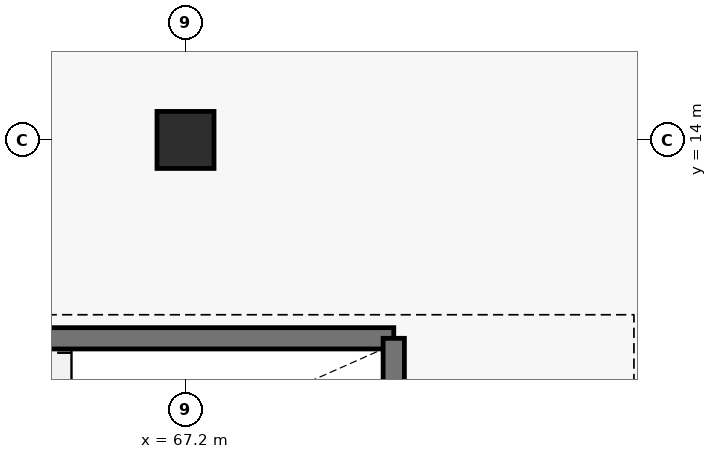
"""IFC4 building model, lengths in metres.
Left out: names, types, materials, properties, quantities, classifications, styles, units other than length and angle.
Written with IfcOpenShell. Run it as: python <this file> out.ifc"""

import sys

from ifc_helpers import new_model, si_unit, direction, frame, frame_2d, origin, origin_2d, place, context, subcontext, project, spatial, rectangle, extrude, element, save


model = new_model("IFC4")
c1 = context("Model", 3, precision=1e-05, world=origin(), true_north=direction((0.0, 1.0)))
c2 = subcontext(c1, "Body", "Model", "MODEL_VIEW")
j1 = project(units=[si_unit("LENGTHUNIT", "METRE"), si_unit("PLANEANGLEUNIT", "RADIAN")], contexts=[c1])
p1 = place(None, origin())
s1 = spatial("IfcSite", under=j1, at=p1, CompositionType="ELEMENT")
p2 = place(p1, origin())
s2 = spatial("IfcBuilding", under=s1, at=p2, CompositionType="ELEMENT")
p3 = place(p2, frame((0.0, 0.0, 9.6)))
s3 = spatial("IfcBuildingStorey", under=s2, at=p3, CompositionType="ELEMENT", Elevation=9.6)
p4 = place(p3, frame((67.2, 14.0, 0.0), z_axis=(0.0, 0.0, 1.0), x_axis=(1.0, 0.0, 0.0)))
e1 = element("IfcColumn", 1, at=p4, inside=s3, PredefinedType="COLUMN", context=c2, shape_type="SweptSolid", body=[
    extrude(rectangle(XDim=0.75, YDim=0.75, at=origin_2d()), origin(), (0.0, 0.0, 1.0), 3.52),
])
p5 = place(p3, frame((61.06, 11.39, 0.0), z_axis=(0.0, 0.0, 1.0), x_axis=(1.0, 0.0, 0.0)))
e2 = element("IfcWall", 2, at=p5, inside=s3, PredefinedType="SHEAR", context=c2, shape_type="SweptSolid", body=[
    extrude(rectangle(XDim=8.88, YDim=0.28, at=frame_2d((4.44, 0.0))), origin(), (0.0, 0.0, 1.0), 3.52),
])
p6 = place(p3, frame((69.94, 7.96, 0.0), z_axis=(0.0, 0.0, 1.0), x_axis=(0.0, 1.0, 0.0)))
e3 = element("IfcWall", 3, at=p6, inside=s3, PredefinedType="SHEAR", context=c2, shape_type="SweptSolid", body=[
    extrude(rectangle(XDim=3.43, YDim=0.28, at=frame_2d((1.715, 0.0))), origin(), (0.0, 0.0, 1.0), 3.52),
])
save(model, sys.argv[1])
